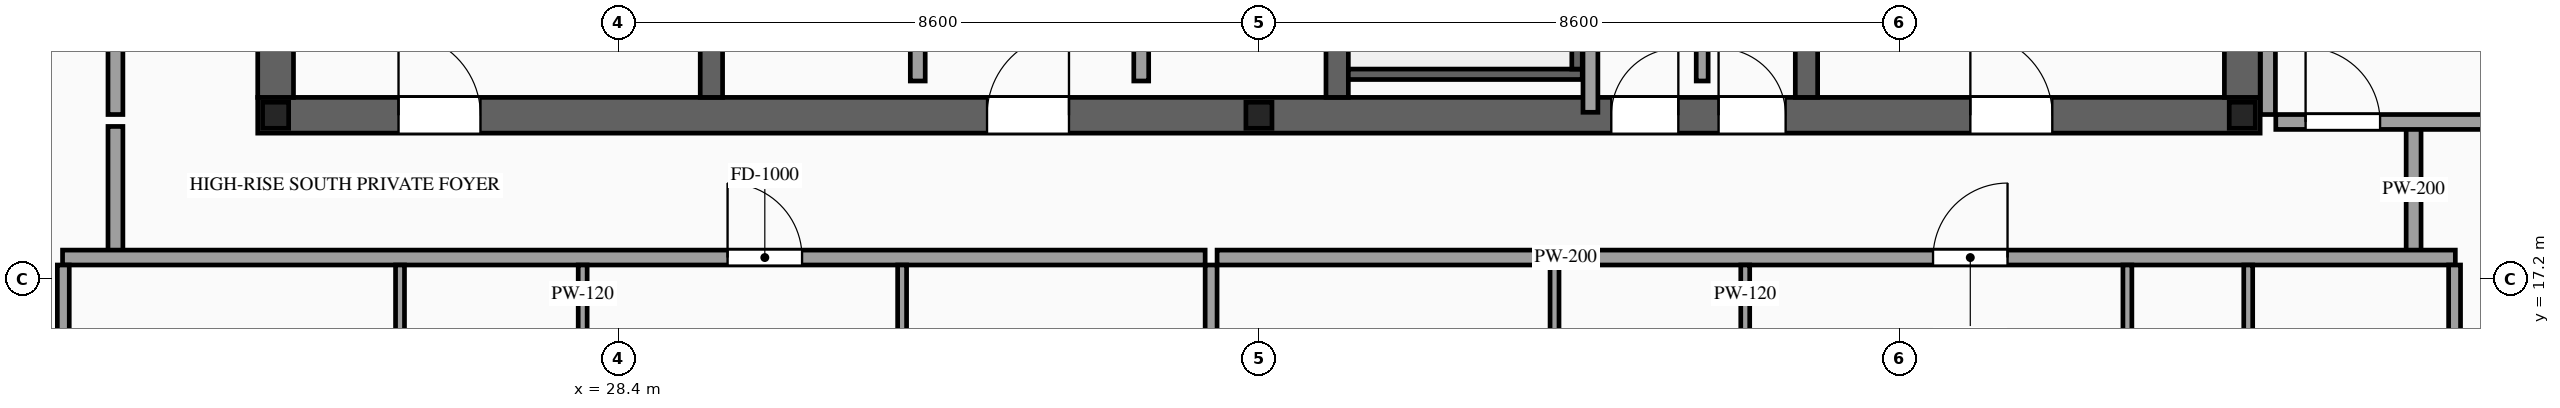
"""IFC4 building model, lengths in metres.
Left out: names, types, materials, properties, quantities, classifications, styles, units other than length and angle.
Written with IfcOpenShell. Run it as: python <this file> out.ifc"""

import sys

from ifc_helpers import new_model, si_unit, direction, frame, frame_2d, origin, origin_2d, place, context, subcontext, project, spatial, rectangle, i_section, extrude, source, transform, mapped, element, fill, save


model = new_model("IFC4")
c1 = context("Model", 3, precision=1e-05, world=origin(), true_north=direction((0.0, 1.0)))
c2 = subcontext(c1, "Body", "Model", "MODEL_VIEW")
j1 = project(units=[si_unit("LENGTHUNIT", "METRE"), si_unit("PLANEANGLEUNIT", "RADIAN")], contexts=[c1])
p1 = place(None, origin())
s1 = spatial("IfcSite", under=j1, at=p1, CompositionType="ELEMENT")
p2 = place(p1, origin())
s2 = spatial("IfcBuilding", under=s1, at=p2, CompositionType="ELEMENT")
p3 = place(p2, frame((0.0, 0.0, 296.1)))
s3 = spatial("IfcBuildingStorey", under=s2, at=p3, CompositionType="ELEMENT", Elevation=296.1)
p4 = place(p3, frame((23.56, 19.4, 0.0), z_axis=(0.0, 0.0, 1.0), x_axis=(1.0, 0.0, 0.0)))
e1 = element("IfcWall", 1, at=p4, inside=s3, PredefinedType="SHEAR", context=c2, shape_type="SweptSolid", body=[
    extrude(rectangle(XDim=26.88, YDim=0.48, at=frame_2d((13.44, 0.0))), origin(), (0.0, 0.0, 1.0), 3.5),
])
p5 = place(p4, frame((1.89, 0.0, 0.0)))
e2 = element("IfcOpeningElement", 2, at=p5, cuts=e1, PredefinedType="OPENING", context=c2, shape_type="SweptSolid", body=[
    extrude(rectangle(XDim=1.1, YDim=2.2, at=frame_2d((0.55, 1.1))), frame((0.0, 0.255, 0.0), z_axis=(0.0, -1.0, 0.0), x_axis=(1.0, 0.0, 0.0)), (0.0, 0.0, 1.0), 0.51),
])
p6 = place(p4, frame((9.79, 0.0, 0.0)))
e3 = element("IfcOpeningElement", 3, at=p6, cuts=e1, PredefinedType="OPENING", context=c2, shape_type="SweptSolid", body=[
    extrude(rectangle(XDim=1.1, YDim=2.2, at=frame_2d((0.55, 1.1))), frame((0.0, 0.255, 0.0), z_axis=(0.0, -1.0, 0.0), x_axis=(1.0, 0.0, 0.0)), (0.0, 0.0, 1.0), 0.51),
])
p7 = place(p4, frame((22.99, 0.0, 0.0)))
e4 = element("IfcOpeningElement", 4, at=p7, cuts=e1, PredefinedType="OPENING", context=c2, shape_type="SweptSolid", body=[
    extrude(rectangle(XDim=1.1, YDim=2.2, at=frame_2d((0.55, 1.1))), frame((0.0, 0.255, 0.0), z_axis=(0.0, -1.0, 0.0), x_axis=(1.0, 0.0, 0.0)), (0.0, 0.0, 1.0), 0.51),
])
p8 = place(p4, frame((19.61, 0.0, 0.0)))
e5 = element("IfcOpeningElement", 5, at=p8, cuts=e1, PredefinedType="OPENING", context=c2, shape_type="SweptSolid", body=[
    extrude(rectangle(XDim=0.9, YDim=2.15, at=frame_2d((0.45, 1.075))), frame((0.0, 0.255, 0.0), z_axis=(0.0, -1.0, 0.0), x_axis=(1.0, 0.0, 0.0)), (0.0, 0.0, 1.0), 0.51),
])
p9 = place(p4, frame((18.17, 0.0, 0.0)))
e6 = element("IfcOpeningElement", 6, at=p9, cuts=e1, PredefinedType="OPENING", context=c2, shape_type="SweptSolid", body=[
    extrude(rectangle(XDim=0.9, YDim=2.15, at=frame_2d((0.45, 1.075))), frame((0.0, 0.255, 0.0), z_axis=(0.0, -1.0, 0.0), x_axis=(1.0, 0.0, 0.0)), (0.0, 0.0, 1.0), 0.51),
])
m1 = source(origin(), c2, "Body", "SweptSolid", [
    extrude(rectangle(XDim=12.32, YDim=0.48, at=frame_2d((6.16, 0.0))), origin(), (0.0, 0.0, 1.0), 3.5),
])
for number, where, z_axis, x_axis in (
    (7, (23.8, 19.64, 0.0), (0.0, 0.0, 1.0), (0.0, 1.0, 0.0)),
    (8, (50.2, 19.64, 0.0), (0.0, 0.0, 1.0), (0.0, 1.0, 0.0)),
):
    element("IfcWall", number, at=place(p3, frame(where, z_axis=z_axis, x_axis=x_axis)), inside=s3, PredefinedType="SHEAR", context=c2, shape_type="MappedRepresentation", body=[
        mapped(m1, transform((0.0, 0.0, 0.0), scale=1.0)),
    ])
m2 = source(origin(), c2, "Body", "SweptSolid", [
    extrude(rectangle(XDim=12.32, YDim=0.3, at=frame_2d((6.16, 0.0))), origin(), (0.0, 0.0, 1.0), 3.5),
])
for number, where, z_axis, x_axis in (
    (9, (29.65, 19.64, 0.0), (0.0, 0.0, 1.0), (0.0, 1.0, 0.0)),
    (10, (38.05, 19.64, 0.0), (0.0, 0.0, 1.0), (0.0, 1.0, 0.0)),
):
    element("IfcWall", number, at=place(p3, frame(where, z_axis=z_axis, x_axis=x_axis)), inside=s3, PredefinedType="SOLIDWALL", context=c2, shape_type="MappedRepresentation", body=[
        mapped(m2, transform((0.0, 0.0, 0.0), scale=1.0)),
    ])
p10 = place(p3, frame((44.35, 19.64, 0.0), z_axis=(0.0, 0.0, 1.0), x_axis=(0.0, 1.0, 0.0)))
e11 = element("IfcWall", 11, at=p10, inside=s3, PredefinedType="SOLIDWALL", context=c2, shape_type="SweptSolid", body=[
    extrude(rectangle(XDim=12.32, YDim=0.3, at=frame_2d((6.16, 0.0))), origin(), (0.0, 0.0, 1.0), 3.5),
])
p11 = place(p10, frame((6.56, 0.0, 0.0)))
e12 = element("IfcOpeningElement", 12, at=p11, cuts=e11, PredefinedType="OPENING", context=c2, shape_type="SweptSolid", body=[
    extrude(rectangle(XDim=1.1, YDim=2.2, at=frame_2d((0.55, 1.1))), frame((0.0, 0.165, 0.0), z_axis=(0.0, -1.0, 0.0), x_axis=(1.0, 0.0, 0.0)), (0.0, 0.0, 1.0), 0.33),
])
p12 = place(p10, frame((8.66, 0.0, 0.0)))
e13 = element("IfcOpeningElement", 13, at=p12, cuts=e11, PredefinedType="OPENING", context=c2, shape_type="SweptSolid", body=[
    extrude(rectangle(XDim=1.1, YDim=2.2, at=frame_2d((0.55, 1.1))), frame((0.0, 0.165, 0.0), z_axis=(0.0, -1.0, 0.0), x_axis=(1.0, 0.0, 0.0)), (0.0, 0.0, 1.0), 0.33),
])
p13 = place(p10, frame((10.76, 0.0, 0.0)))
e14 = element("IfcOpeningElement", 14, at=p13, cuts=e11, PredefinedType="OPENING", context=c2, shape_type="SweptSolid", body=[
    extrude(rectangle(XDim=1.1, YDim=2.2, at=frame_2d((0.55, 1.1))), frame((0.0, 0.165, 0.0), z_axis=(0.0, -1.0, 0.0), x_axis=(1.0, 0.0, 0.0)), (0.0, 0.0, 1.0), 0.33),
])
m3 = source(origin(), c2, "Body", "SweptSolid", [
    extrude(i_section(OverallWidth=0.35, OverallDepth=0.35, WebThickness=0.012, FlangeThickness=0.019, at=origin_2d()), origin(), (0.0, 0.0, 1.0), 3.5),
])
for number, where, z_axis, x_axis in (
    (15, (23.8, 19.4, 0.0), (0.0, 0.0, 1.0), (1.0, 0.0, 0.0)),
    (16, (37.0, 19.4, 0.0), (0.0, 0.0, 1.0), (1.0, 0.0, 0.0)),
    (17, (50.2, 19.4, 0.0), (0.0, 0.0, 1.0), (1.0, 0.0, 0.0)),
):
    element("IfcColumn", number, at=place(p3, frame(where, z_axis=z_axis, x_axis=x_axis)), inside=s3, PredefinedType="COLUMN", context=c2, shape_type="MappedRepresentation", body=[
        mapped(m3, transform((0.0, 0.0, 0.0), scale=1.0)),
    ])
m4 = source(origin(), c2, "Body", "SweptSolid", [
    extrude(rectangle(XDim=3.14, YDim=0.14, at=frame_2d((1.57, 0.0))), origin(), (0.0, 0.0, 1.0), 3.28),
])
p14 = place(p3, frame((38.2, 19.95, 0.0), z_axis=(0.0, 0.0, 1.0), x_axis=(1.0, 0.0, 0.0)))
e18 = element("IfcWall", 18, at=p14, inside=s3, PredefinedType="SOLIDWALL", context=c2, shape_type="MappedRepresentation", body=[
    mapped(m4, transform((0.0, 0.0, 0.0), scale=1.0)),
])
m5 = source(origin(), c2, "Body", "SweptSolid", [
    extrude(rectangle(XDim=8.94, YDim=0.14, at=frame_2d((4.47, 0.0))), origin(), (0.0, 0.0, 1.0), 3.28),
])
p15 = place(p3, frame((41.27, 20.02, 0.0), z_axis=(0.0, 0.0, 1.0), x_axis=(0.0, 1.0, 0.0)))
e19 = element("IfcWall", 19, at=p15, inside=s3, PredefinedType="SOLIDWALL", context=c2, shape_type="MappedRepresentation", body=[
    mapped(m5, transform((0.0, 0.0, 0.0), scale=1.0)),
])
p16 = place(p3, frame((32.42, 19.86, 0.0), z_axis=(0.0, 0.0, 1.0), x_axis=(0.0, 1.0, 0.0)))
e20 = element("IfcWall", 20, at=p16, inside=s3, PredefinedType="PARTITIONING", context=c2, shape_type="SweptSolid", body=[
    extrude(rectangle(XDim=5.84, YDim=0.2, at=frame_2d((2.92, 0.0))), origin(), (0.0, 0.0, 1.0), 3.28),
])
p17 = place(p16, frame((2.47, 0.0, 0.0)))
e21 = element("IfcOpeningElement", 21, at=p17, cuts=e20, PredefinedType="OPENING", context=c2, shape_type="SweptSolid", body=[
    extrude(rectangle(XDim=0.9, YDim=2.15, at=frame_2d((0.45, 1.075))), frame((0.0, 0.115, 0.0), z_axis=(0.0, -1.0, 0.0), x_axis=(1.0, 0.0, 0.0)), (0.0, 0.0, 1.0), 0.23),
])
p18 = place(p3, frame((35.42, 19.86, 0.0), z_axis=(0.0, 0.0, 1.0), x_axis=(0.0, 1.0, 0.0)))
e22 = element("IfcWall", 22, at=p18, inside=s3, PredefinedType="PARTITIONING", context=c2, shape_type="SweptSolid", body=[
    extrude(rectangle(XDim=2.24, YDim=0.2, at=frame_2d((1.12, 0.0))), origin(), (0.0, 0.0, 1.0), 3.28),
])
p19 = place(p18, frame((0.67, 0.0, 0.0)))
e23 = element("IfcOpeningElement", 23, at=p19, cuts=e22, PredefinedType="OPENING", context=c2, shape_type="SweptSolid", body=[
    extrude(rectangle(XDim=0.9, YDim=2.15, at=frame_2d((0.45, 1.075))), frame((0.0, 0.115, 0.0), z_axis=(0.0, -1.0, 0.0), x_axis=(1.0, 0.0, 0.0)), (0.0, 0.0, 1.0), 0.23),
])
m6 = source(origin(), c2, "Body", "SweptSolid", [
    extrude(rectangle(XDim=1.34, YDim=0.16, at=frame_2d((0.67, 0.0))), origin(), (0.0, 0.0, 1.0), 3.28),
])
p20 = place(p3, frame((42.95, 19.86, 0.0), z_axis=(0.0, 0.0, 1.0), x_axis=(0.0, 1.0, 0.0)))
e24 = element("IfcWall", 24, at=p20, inside=s3, PredefinedType="PARTITIONING", context=c2, shape_type="MappedRepresentation", body=[
    mapped(m6, transform((0.0, 0.0, 0.0), scale=1.0)),
])
m7 = source(origin(), c2, "Body", "SweptSolid", [
    extrude(rectangle(XDim=6.06, YDim=0.2, at=frame_2d((3.03, 0.0))), origin(), (0.0, 0.0, 1.0), 3.28),
])
p21 = place(p3, frame((41.45, 19.44, 0.0), z_axis=(0.0, 0.0, 1.0), x_axis=(0.0, 1.0, 0.0)))
e25 = element("IfcWall", 25, at=p21, inside=s3, PredefinedType="PARTITIONING", context=c2, shape_type="MappedRepresentation", body=[
    mapped(m7, transform((0.0, 0.0, 0.0), scale=1.0)),
])
m8 = source(origin(), c2, "Body", "SweptSolid", [
    extrude(rectangle(XDim=1.7, YDim=0.2, at=frame_2d((0.85, 0.0))), origin(), (0.0, 0.0, 1.0), 3.28),
])
for number, where, z_axis, x_axis in (
    (26, (21.65, 17.55, 0.0), (0.0, 0.0, 1.0), (0.0, 1.0, 0.0)),
    (27, (52.5, 17.55, 0.0), (0.0, 0.0, 1.0), (0.0, 1.0, 0.0)),
):
    element("IfcWall", number, at=place(p3, frame(where, z_axis=z_axis, x_axis=x_axis)), inside=s3, PredefinedType="PARTITIONING", context=c2, shape_type="MappedRepresentation", body=[
        mapped(m8, transform((0.0, 0.0, 0.0), scale=1.0)),
    ])
p22 = place(p3, frame((20.94, 17.49, 0.0), z_axis=(0.0, 0.0, 1.0), x_axis=(1.0, 0.0, 0.0)))
e28 = element("IfcWall", 28, at=p22, inside=s3, PredefinedType="PARTITIONING", context=c2, shape_type="SweptSolid", body=[
    extrude(rectangle(XDim=15.338, YDim=0.2, at=frame_2d((7.669, 0.0))), origin(), (0.0, 0.0, 1.0), 3.28),
])
p23 = place(p22, frame((8.927, 0.0, 0.0)))
e29 = element("IfcOpeningElement", 29, at=p23, cuts=e28, PredefinedType="OPENING", context=c2, shape_type="SweptSolid", body=[
    extrude(rectangle(XDim=1.0, YDim=2.2, at=frame_2d((0.5, 1.1))), frame((0.0, 0.115, 0.0), z_axis=(0.0, -1.0, 0.0), x_axis=(1.0, 0.0, 0.0)), (0.0, 0.0, 1.0), 0.23),
])
m9 = source(origin(), c2, "Body", "SweptSolid", [
    extrude(rectangle(XDim=10.54, YDim=0.16, at=frame_2d((5.27, 0.0))), origin(), (0.0, 0.0, 1.0), 3.28),
])
p24 = place(p3, frame((36.358, 6.85, 0.0), z_axis=(0.0, 0.0, 1.0), x_axis=(0.0, 1.0, 0.0)))
e30 = element("IfcWall", 30, at=p24, inside=s3, PredefinedType="PARTITIONING", context=c2, shape_type="MappedRepresentation", body=[
    mapped(m9, transform((0.0, 0.0, 0.0), scale=1.0)),
])
m10 = source(origin(), c2, "Body", "SweptSolid", [
    extrude(rectangle(XDim=2.9, YDim=0.12, at=frame_2d((1.45, 0.0))), origin(), (0.0, 0.0, 1.0), 3.28),
])
p25 = place(p3, frame((25.47, 14.49, 0.0), z_axis=(0.0, 0.0, 1.0), x_axis=(0.0, 1.0, 0.0)))
e31 = element("IfcWall", 31, at=p25, inside=s3, PredefinedType="PARTITIONING", context=c2, shape_type="MappedRepresentation", body=[
    mapped(m10, transform((0.0, 0.0, 0.0), scale=1.0)),
])
p26 = place(p3, frame((27.922, 14.49, 0.0), z_axis=(0.0, 0.0, 1.0), x_axis=(0.0, 1.0, 0.0)))
e32 = element("IfcWall", 32, at=p26, inside=s3, PredefinedType="PARTITIONING", context=c2, shape_type="SweptSolid", body=[
    extrude(rectangle(XDim=2.9, YDim=0.12, at=frame_2d((1.45, 0.0))), origin(), (0.0, 0.0, 1.0), 3.28),
])
p27 = place(p26, frame((1.025, 0.0, 0.0)))
e33 = element("IfcOpeningElement", 33, at=p27, cuts=e32, PredefinedType="OPENING", context=c2, shape_type="SweptSolid", body=[
    extrude(rectangle(XDim=0.85, YDim=2.1, at=frame_2d((0.425, 1.05))), frame((0.0, 0.075, 0.0), z_axis=(0.0, -1.0, 0.0), x_axis=(1.0, 0.0, 0.0)), (0.0, 0.0, 1.0), 0.15),
])
p28 = place(p3, frame((32.21, 14.49, 0.0), z_axis=(0.0, 0.0, 1.0), x_axis=(0.0, 1.0, 0.0)))
e34 = element("IfcWall", 34, at=p28, inside=s3, PredefinedType="PARTITIONING", context=c2, shape_type="MappedRepresentation", body=[
    mapped(m10, transform((0.0, 0.0, 0.0), scale=1.0)),
])
p29 = place(p3, frame((36.438, 17.49, 0.0), z_axis=(0.0, 0.0, 1.0), x_axis=(1.0, 0.0, 0.0)))
e35 = element("IfcWall", 35, at=p29, inside=s3, PredefinedType="PARTITIONING", context=c2, shape_type="SweptSolid", body=[
    extrude(rectangle(XDim=16.622, YDim=0.2, at=frame_2d((8.311, 0.0))), origin(), (0.0, 0.0, 1.0), 3.28),
])
p30 = place(p29, frame((9.611, 0.0, 0.0)))
e36 = element("IfcOpeningElement", 36, at=p30, cuts=e35, PredefinedType="OPENING", context=c2, shape_type="SweptSolid", body=[
    extrude(rectangle(XDim=1.0, YDim=2.2, at=frame_2d((0.5, 1.1))), frame((0.0, 0.115, 0.0), z_axis=(0.0, -1.0, 0.0), x_axis=(1.0, 0.0, 0.0)), (0.0, 0.0, 1.0), 0.23),
])
m11 = source(origin(), c2, "Body", "SweptSolid", [
    extrude(rectangle(XDim=10.39, YDim=0.16, at=frame_2d((5.195, 0.0))), origin(), (0.0, 0.0, 1.0), 3.28),
])
for number, where, z_axis, x_axis in (
    (37, (20.95, 7.0, 0.0), (0.0, 0.0, 1.0), (0.0, 1.0, 0.0)),
    (38, (53.05, 7.0, 0.0), (0.0, 0.0, 1.0), (0.0, 1.0, 0.0)),
):
    element("IfcWall", number, at=place(p3, frame(where, z_axis=z_axis, x_axis=x_axis)), inside=s3, PredefinedType="PARTITIONING", context=c2, shape_type="MappedRepresentation", body=[
        mapped(m11, transform((0.0, 0.0, 0.0), scale=1.0)),
    ])
p31 = place(p3, frame((40.968, 14.49, 0.0), z_axis=(0.0, 0.0, 1.0), x_axis=(0.0, 1.0, 0.0)))
e39 = element("IfcWall", 39, at=p31, inside=s3, PredefinedType="PARTITIONING", context=c2, shape_type="MappedRepresentation", body=[
    mapped(m10, transform((0.0, 0.0, 0.0), scale=1.0)),
])
p32 = place(p3, frame((43.528, 14.49, 0.0), z_axis=(0.0, 0.0, 1.0), x_axis=(0.0, 1.0, 0.0)))
e40 = element("IfcWall", 40, at=p32, inside=s3, PredefinedType="PARTITIONING", context=c2, shape_type="SweptSolid", body=[
    extrude(rectangle(XDim=2.9, YDim=0.12, at=frame_2d((1.45, 0.0))), origin(), (0.0, 0.0, 1.0), 3.28),
])
p33 = place(p32, frame((1.025, 0.0, 0.0)))
e41 = element("IfcOpeningElement", 41, at=p33, cuts=e40, PredefinedType="OPENING", context=c2, shape_type="SweptSolid", body=[
    extrude(rectangle(XDim=0.85, YDim=2.1, at=frame_2d((0.425, 1.05))), frame((0.0, 0.075, 0.0), z_axis=(0.0, -1.0, 0.0), x_axis=(1.0, 0.0, 0.0)), (0.0, 0.0, 1.0), 0.15),
])
m12 = source(origin(), c2, "Body", "SweptSolid", [
    extrude(rectangle(XDim=2.9, YDim=0.12, at=frame_2d((1.45, 0.0))), origin(), (0.0, 0.0, 1.0), 2.825),
])
p34 = place(p3, frame((50.28, 14.49, 0.0), z_axis=(0.0, 0.0, 1.0), x_axis=(0.0, 1.0, 0.0)))
e42 = element("IfcWall", 42, at=p34, inside=s3, PredefinedType="PARTITIONING", context=c2, shape_type="MappedRepresentation", body=[
    mapped(m12, transform((0.0, 0.0, 0.0), scale=1.0)),
])
p35 = place(p3, frame((48.658, 14.49, 0.0), z_axis=(0.0, 0.0, 1.0), x_axis=(0.0, 1.0, 0.0)))
e43 = element("IfcWall", 43, at=p35, inside=s3, PredefinedType="PARTITIONING", context=c2, shape_type="MappedRepresentation", body=[
    mapped(m10, transform((0.0, 0.0, 0.0), scale=1.0)),
])
p36 = place(p3, frame((21.65, 19.41, 0.0), z_axis=(0.0, 0.0, 1.0), x_axis=(0.0, 1.0, 0.0)))
e44 = element("IfcWall", 44, at=p36, inside=s3, PredefinedType="PARTITIONING", context=c2, shape_type="SweptSolid", body=[
    extrude(rectangle(XDim=12.78, YDim=0.2, at=frame_2d((6.39, 0.0))), origin(), (0.0, 0.0, 1.0), 3.28),
])
p37 = place(p36, frame((5.89, 0.0, 0.0)))
e45 = element("IfcOpeningElement", 45, at=p37, cuts=e44, PredefinedType="OPENING", context=c2, shape_type="SweptSolid", body=[
    extrude(rectangle(XDim=1.0, YDim=2.2, at=frame_2d((0.5, 1.1))), frame((0.0, 0.115, 0.0), z_axis=(0.0, -1.0, 0.0), x_axis=(1.0, 0.0, 0.0)), (0.0, 0.0, 1.0), 0.23),
])
p38 = place(p3, frame((50.65, 19.31, 0.0), z_axis=(0.0, 0.0, 1.0), x_axis=(1.0, 0.0, 0.0)))
e46 = element("IfcWall", 46, at=p38, inside=s3, PredefinedType="PARTITIONING", context=c2, shape_type="SweptSolid", body=[
    extrude(rectangle(XDim=5.3, YDim=0.2, at=frame_2d((2.65, 0.0))), origin(), (0.0, 0.0, 1.0), 2.825),
])
p39 = place(p38, frame((0.4, 0.0, 0.0)))
e47 = element("IfcOpeningElement", 47, at=p39, cuts=e46, PredefinedType="OPENING", context=c2, shape_type="SweptSolid", body=[
    extrude(rectangle(XDim=1.0, YDim=2.2, at=frame_2d((0.5, 1.1))), frame((0.0, 0.115, 0.0), z_axis=(0.0, -1.0, 0.0), x_axis=(1.0, 0.0, 0.0)), (0.0, 0.0, 1.0), 0.23),
])
m13 = source(origin(), c2, "Body", "SweptSolid", [
    extrude(rectangle(XDim=12.78, YDim=0.2, at=frame_2d((6.39, 0.0))), origin(), (0.0, 0.0, 1.0), 3.28),
])
p40 = place(p3, frame((50.545, 19.41, 0.0), z_axis=(0.0, 0.0, 1.0), x_axis=(0.0, 1.0, 0.0)))
e48 = element("IfcWall", 48, at=p40, inside=s3, PredefinedType="PARTITIONING", context=c2, shape_type="MappedRepresentation", body=[
    mapped(m13, transform((0.0, 0.0, 0.0), scale=1.0)),
])
m14 = source(origin(), c2, "Body", "SweptSolid", [
    extrude(rectangle(XDim=1.1, YDim=2.2, at=frame_2d((0.55, 1.1))), frame((0.0, 0.025, 0.0), z_axis=(0.0, -1.0, 0.0), x_axis=(1.0, 0.0, 0.0)), (0.0, 0.0, 1.0), 0.05),
])
p41 = place(p5, origin())
e49 = element("IfcDoor", 49, at=p41, inside=s3, OperationType="SINGLE_SWING_LEFT", PredefinedType="DOOR", context=c2, shape_type="MappedRepresentation", body=[
    mapped(m14, transform((0.0, 0.0, 0.0), scale=1.0)),
])
fill(e2, e49)
p42 = place(p6, origin())
e50 = element("IfcDoor", 50, at=p42, inside=s3, OperationType="SINGLE_SWING_RIGHT", PredefinedType="DOOR", context=c2, shape_type="MappedRepresentation", body=[
    mapped(m14, transform((0.0, 0.0, 0.0), scale=1.0)),
])
fill(e3, e50)
p43 = place(p7, origin())
e51 = element("IfcDoor", 51, at=p43, inside=s3, OperationType="SINGLE_SWING_LEFT", PredefinedType="DOOR", context=c2, shape_type="MappedRepresentation", body=[
    mapped(m14, transform((0.0, 0.0, 0.0), scale=1.0)),
])
fill(e4, e51)
m15 = source(origin(), c2, "Body", "SweptSolid", [
    extrude(rectangle(XDim=0.9, YDim=2.15, at=frame_2d((0.45, 1.075))), frame((0.0, 0.025, 0.0), z_axis=(0.0, -1.0, 0.0), x_axis=(1.0, 0.0, 0.0)), (0.0, 0.0, 1.0), 0.05),
])
p44 = place(p8, origin())
e52 = element("IfcDoor", 52, at=p44, inside=s3, OperationType="SINGLE_SWING_LEFT", PredefinedType="DOOR", context=c2, shape_type="MappedRepresentation", body=[
    mapped(m15, transform((0.0, 0.0, 0.0), scale=1.0)),
])
fill(e5, e52)
p45 = place(p9, origin())
e53 = element("IfcDoor", 53, at=p45, inside=s3, OperationType="SINGLE_SWING_RIGHT", PredefinedType="DOOR", context=c2, shape_type="MappedRepresentation", body=[
    mapped(m15, transform((0.0, 0.0, 0.0), scale=1.0)),
])
fill(e6, e53)
m16 = source(origin(), c2, "Body", "SweptSolid", [
    extrude(rectangle(XDim=1.0, YDim=2.2, at=frame_2d((0.5, 1.1))), frame((0.0, 0.025, 0.0), z_axis=(0.0, -1.0, 0.0), x_axis=(1.0, 0.0, 0.0)), (0.0, 0.0, 1.0), 0.05),
])
p46 = place(p23, origin())
e54 = element("IfcDoor", 54, at=p46, inside=s3, OperationType="SINGLE_SWING_LEFT", PredefinedType="DOOR", context=c2, shape_type="MappedRepresentation", body=[
    mapped(m16, transform((0.0, 0.0, 0.0), scale=1.0)),
])
fill(e29, e54)
p47 = place(p30, origin())
e55 = element("IfcDoor", 55, at=p47, inside=s3, OperationType="SINGLE_SWING_RIGHT", PredefinedType="DOOR", context=c2, shape_type="MappedRepresentation", body=[
    mapped(m16, transform((0.0, 0.0, 0.0), scale=1.0)),
])
fill(e36, e55)
p48 = place(p39, origin())
e56 = element("IfcDoor", 56, at=p48, inside=s3, OperationType="SINGLE_SWING_LEFT", PredefinedType="DOOR", context=c2, shape_type="MappedRepresentation", body=[
    mapped(m16, transform((0.0, 0.0, 0.0), scale=1.0)),
])
fill(e47, e56)
save(model, sys.argv[1])
